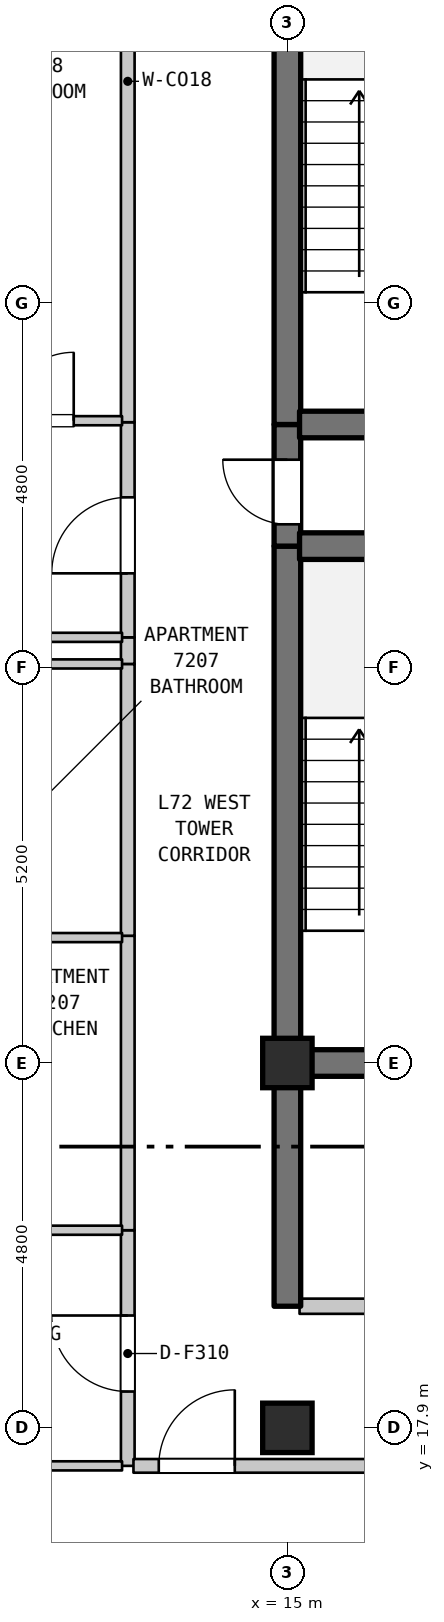
"""IFC4 building model, lengths in metres.
Left out: names, types, materials, properties, quantities, classifications, styles, units other than length and angle.
Written with IfcOpenShell. Run it as: python <this file> out.ifc"""

import sys

from ifc_helpers import new_model, si_unit, direction, frame, frame_2d, origin, origin_2d, place, context, subcontext, project, spatial, rectangle, extrude, element, fill, save


model = new_model("IFC4")
c1 = context("Model", 3, precision=1e-05, world=origin(), true_north=direction((0.0, 1.0)))
c2 = subcontext(c1, "Body", "Model", "MODEL_VIEW")
j1 = project(units=[si_unit("LENGTHUNIT", "METRE"), si_unit("PLANEANGLEUNIT", "RADIAN")], contexts=[c1])
p1 = place(None, origin())
s1 = spatial("IfcSite", under=j1, at=p1, CompositionType="ELEMENT")
p2 = place(p1, origin())
s2 = spatial("IfcBuilding", under=s1, at=p2, CompositionType="ELEMENT")
p3 = place(p2, frame((0.0, 0.0, 288.0)))
s3 = spatial("IfcBuildingStorey", under=s2, at=p3, CompositionType="ELEMENT", Elevation=288.0)
for number, where, z_axis, x_axis in (
    (1, (15.0, 17.9, 0.0), (0.0, 0.0, 1.0), (1.0, 0.0, 0.0)),
    (2, (15.0, 22.7, 0.0), (0.0, 0.0, 1.0), (1.0, 0.0, 0.0)),
):
    element("IfcColumn", number, at=place(p3, frame(where, z_axis=z_axis, x_axis=x_axis)), inside=s3, PredefinedType="COLUMN", context=c2, shape_type="SweptSolid", body=[
        extrude(rectangle(XDim=0.65, YDim=0.65, at=origin_2d()), origin(), (0.0, 0.0, 1.0), 3.7),
    ])
p4 = place(p3, frame((12.9, 17.4, 0.0), z_axis=(0.0, 0.0, 1.0), x_axis=(0.0, 1.0, 0.0)))
e3 = element("IfcWall", 3, at=p4, inside=s3, PredefinedType="STANDARD", context=c2, shape_type="SweptSolid", body=[
    extrude(rectangle(XDim=3.1, YDim=0.18, at=frame_2d((1.55, 0.0))), origin(), (0.0, 0.0, 1.0), 3.39),
])
p5 = place(p4, frame((0.978, 0.0, 0.0)))
e4 = element("IfcOpeningElement", 4, at=p5, cuts=e3, PredefinedType="OPENING", context=c2, shape_type="SweptSolid", body=[
    extrude(rectangle(XDim=1.0, YDim=2.15, at=frame_2d((0.5, 1.075))), frame((0.0, 0.1, 0.0), z_axis=(0.0, -1.0, 0.0), x_axis=(1.0, 0.0, 0.0)), (0.0, 0.0, 1.0), 0.2),
])
p6 = place(p3, frame((12.9, 20.5, 0.0), z_axis=(0.0, 0.0, 1.0), x_axis=(0.0, 1.0, 0.0)))
e5 = element("IfcWall", 5, at=p6, inside=s3, PredefinedType="STANDARD", context=c2, shape_type="SweptSolid", body=[
    extrude(rectangle(XDim=3.874, YDim=0.18, at=frame_2d((1.937, 0.0))), origin(), (0.0, 0.0, 1.0), 3.39),
])
p7 = place(p3, frame((12.9, 24.374, 0.0), z_axis=(0.0, 0.0, 1.0), x_axis=(0.0, 1.0, 0.0)))
e6 = element("IfcWall", 6, at=p7, inside=s3, PredefinedType="STANDARD", context=c2, shape_type="SweptSolid", body=[
    extrude(rectangle(XDim=3.576, YDim=0.18, at=frame_2d((1.788, 0.0))), origin(), (0.0, 0.0, 1.0), 3.39),
])
p8 = place(p3, frame((12.9, 27.95, 0.0), z_axis=(0.0, 0.0, 1.0), x_axis=(0.0, 1.0, 0.0)))
e7 = element("IfcWall", 7, at=p8, inside=s3, PredefinedType="STANDARD", context=c2, shape_type="SweptSolid", body=[
    extrude(rectangle(XDim=0.35, YDim=0.18, at=frame_2d((0.175, 0.0))), origin(), (0.0, 0.0, 1.0), 3.39),
])
p9 = place(p3, frame((12.9, 28.3, 0.0), z_axis=(0.0, 0.0, 1.0), x_axis=(0.0, 1.0, 0.0)))
e8 = element("IfcWall", 8, at=p9, inside=s3, PredefinedType="STANDARD", context=c2, shape_type="SweptSolid", body=[
    extrude(rectangle(XDim=2.83, YDim=0.18, at=frame_2d((1.415, 0.0))), origin(), (0.0, 0.0, 1.0), 3.39),
])
p10 = place(p9, frame((0.842, 0.0, 0.0)))
e9 = element("IfcOpeningElement", 9, at=p10, cuts=e8, PredefinedType="OPENING", context=c2, shape_type="SweptSolid", body=[
    extrude(rectangle(XDim=1.0, YDim=2.15, at=frame_2d((0.5, 1.075))), frame((0.0, 0.1, 0.0), z_axis=(0.0, -1.0, 0.0), x_axis=(1.0, 0.0, 0.0)), (0.0, 0.0, 1.0), 0.2),
])
p11 = place(p3, frame((12.9, 31.13, 0.0), z_axis=(0.0, 0.0, 1.0), x_axis=(0.0, 1.0, 0.0)))
e10 = element("IfcWall", 10, at=p11, inside=s3, PredefinedType="STANDARD", context=c2, shape_type="SweptSolid", body=[
    extrude(rectangle(XDim=8.97, YDim=0.18, at=frame_2d((4.485, 0.0))), origin(), (0.0, 0.0, 1.0), 3.39),
])
p12 = place(p3, frame((15.0, 19.5, 0.0), z_axis=(0.0, 0.0, 1.0), x_axis=(0.0, 1.0, 0.0)))
e11 = element("IfcWall", 11, at=p12, inside=s3, PredefinedType="SHEAR", context=c2, shape_type="SweptSolid", body=[
    extrude(rectangle(XDim=3.2, YDim=0.35, at=frame_2d((1.6, 0.0))), origin(), (0.0, 0.0, 1.0), 3.39),
])
p13 = place(p3, frame((15.0, 22.7, 0.0), z_axis=(0.0, 0.0, 1.0), x_axis=(0.0, 1.0, 0.0)))
e12 = element("IfcWall", 12, at=p13, inside=s3, PredefinedType="SHEAR", context=c2, shape_type="SweptSolid", body=[
    extrude(rectangle(XDim=6.8, YDim=0.35, at=frame_2d((3.4, 0.0))), origin(), (0.0, 0.0, 1.0), 3.39),
])
p14 = place(p3, frame((15.0, 29.5, 0.0), z_axis=(0.0, 0.0, 1.0), x_axis=(0.0, 1.0, 0.0)))
e13 = element("IfcWall", 13, at=p14, inside=s3, PredefinedType="SHEAR", context=c2, shape_type="SweptSolid", body=[
    extrude(rectangle(XDim=1.6, YDim=0.35, at=frame_2d((0.8, 0.0))), origin(), (0.0, 0.0, 1.0), 3.39),
])
p15 = place(p14, frame((0.287, 0.0, 0.0)))
e14 = element("IfcOpeningElement", 14, at=p15, cuts=e13, PredefinedType="OPENING", context=c2, shape_type="SweptSolid", body=[
    extrude(rectangle(XDim=0.85, YDim=2.1, at=frame_2d((0.425, 1.05))), frame((0.0, 0.185, 0.0), z_axis=(0.0, -1.0, 0.0), x_axis=(1.0, 0.0, 0.0)), (0.0, 0.0, 1.0), 0.37),
])
p16 = place(p3, frame((15.0, 31.1, 0.0), z_axis=(0.0, 0.0, 1.0), x_axis=(0.0, 1.0, 0.0)))
e15 = element("IfcWall", 15, at=p16, inside=s3, PredefinedType="SHEAR", context=c2, shape_type="SweptSolid", body=[
    extrude(rectangle(XDim=6.8, YDim=0.35, at=frame_2d((3.4, 0.0))), origin(), (0.0, 0.0, 1.0), 3.39),
])
p17 = place(p3, frame((8.973, 17.4, 0.0), z_axis=(0.0, 0.0, 1.0), x_axis=(1.0, 0.0, 0.0)))
e16 = element("IfcWall", 16, at=p17, inside=s3, PredefinedType="PARTITIONING", context=c2, shape_type="SweptSolid", body=[
    extrude(rectangle(XDim=3.852, YDim=0.12, at=frame_2d((1.926, 0.0))), origin(), (0.0, 0.0, 1.0), 3.39),
])
p18 = place(p3, frame((12.975, 17.4, 0.0), z_axis=(0.0, 0.0, 1.0), x_axis=(1.0, 0.0, 0.0)))
e17 = element("IfcWall", 17, at=p18, inside=s3, PredefinedType="STANDARD", context=c2, shape_type="SweptSolid", body=[
    extrude(rectangle(XDim=3.48, YDim=0.18, at=frame_2d((1.74, 0.0))), origin(), (0.0, 0.0, 1.0), 3.39),
])
p19 = place(p18, frame((0.333, 0.0, 0.0)))
e18 = element("IfcOpeningElement", 18, at=p19, cuts=e17, PredefinedType="OPENING", context=c2, shape_type="SweptSolid", body=[
    extrude(rectangle(XDim=1.0, YDim=2.15, at=frame_2d((0.5, 1.075))), frame((0.0, 0.1, 0.0), z_axis=(0.0, -1.0, 0.0), x_axis=(1.0, 0.0, 0.0)), (0.0, 0.0, 1.0), 0.2),
])
p20 = place(p3, frame((15.16, 19.5, 0.0), z_axis=(0.0, 0.0, 1.0), x_axis=(1.0, 0.0, 0.0)))
e19 = element("IfcWall", 19, at=p20, inside=s3, PredefinedType="STANDARD", context=c2, shape_type="SweptSolid", body=[
    extrude(rectangle(XDim=3.68, YDim=0.2, at=frame_2d((1.84, 0.0))), origin(), (0.0, 0.0, 1.0), 3.39),
])
p21 = place(p20, frame((1.39, 0.0, 0.0)))
e20 = element("IfcOpeningElement", 20, at=p21, cuts=e19, PredefinedType="OPENING", context=c2, shape_type="SweptSolid", body=[
    extrude(rectangle(XDim=0.9, YDim=2.15, at=frame_2d((0.45, 1.075))), frame((0.0, 0.11, 0.0), z_axis=(0.0, -1.0, 0.0), x_axis=(1.0, 0.0, 0.0)), (0.0, 0.0, 1.0), 0.22),
])
p22 = place(p3, frame((10.695, 20.5, 0.0), z_axis=(0.0, 0.0, 1.0), x_axis=(1.0, 0.0, 0.0)))
e21 = element("IfcWall", 21, at=p22, inside=s3, PredefinedType="PARTITIONING", context=c2, shape_type="SweptSolid", body=[
    extrude(rectangle(XDim=2.13, YDim=0.12, at=frame_2d((1.065, 0.0))), origin(), (0.0, 0.0, 1.0), 3.39),
])
p23 = place(p3, frame((15.16, 22.7, 0.0), z_axis=(0.0, 0.0, 1.0), x_axis=(1.0, 0.0, 0.0)))
e22 = element("IfcWall", 22, at=p23, inside=s3, PredefinedType="SHEAR", context=c2, shape_type="SweptSolid", body=[
    extrude(rectangle(XDim=3.68, YDim=0.35, at=frame_2d((1.84, 0.0))), origin(), (0.0, 0.0, 1.0), 3.39),
])
for number, where, z_axis, x_axis in (
    (23, (10.695, 24.35, 0.0), (0.0, 0.0, 1.0), (1.0, 0.0, 0.0)),
    (24, (10.695, 27.95, 0.0), (0.0, 0.0, 1.0), (1.0, 0.0, 0.0)),
):
    element("IfcWall", number, at=place(p3, frame(where, z_axis=z_axis, x_axis=x_axis)), inside=s3, PredefinedType="PARTITIONING", context=c2, shape_type="SweptSolid", body=[
        extrude(rectangle(XDim=2.13, YDim=0.12, at=frame_2d((1.065, 0.0))), origin(), (0.0, 0.0, 1.0), 3.39),
    ])
p24 = place(p3, frame((9.175, 28.3, 0.0), z_axis=(0.0, 0.0, 1.0), x_axis=(1.0, 0.0, 0.0)))
e25 = element("IfcWall", 25, at=p24, inside=s3, PredefinedType="PARTITIONING", context=c2, shape_type="SweptSolid", body=[
    extrude(rectangle(XDim=3.65, YDim=0.12, at=frame_2d((1.825, 0.0))), origin(), (0.0, 0.0, 1.0), 3.39),
])
for number, where, z_axis, x_axis in (
    (26, (15.16, 29.5, 0.0), (0.0, 0.0, 1.0), (1.0, 0.0, 0.0)),
    (27, (15.16, 31.1, 0.0), (0.0, 0.0, 1.0), (1.0, 0.0, 0.0)),
):
    element("IfcWall", number, at=place(p3, frame(where, z_axis=z_axis, x_axis=x_axis)), inside=s3, PredefinedType="SHEAR", context=c2, shape_type="SweptSolid", body=[
        extrude(rectangle(XDim=3.68, YDim=0.35, at=frame_2d((1.84, 0.0))), origin(), (0.0, 0.0, 1.0), 3.39),
    ])
p25 = place(p3, frame((10.623, 31.15, 0.0), z_axis=(0.0, 0.0, 1.0), x_axis=(1.0, 0.0, 0.0)))
e28 = element("IfcWall", 28, at=p25, inside=s3, PredefinedType="PARTITIONING", context=c2, shape_type="SweptSolid", body=[
    extrude(rectangle(XDim=2.202, YDim=0.12, at=frame_2d((1.101, 0.0))), origin(), (0.0, 0.0, 1.0), 3.39),
])
p26 = place(p25, frame((0.666, 0.0, 0.0)))
e29 = element("IfcOpeningElement", 29, at=p26, cuts=e28, PredefinedType="OPENING", context=c2, shape_type="SweptSolid", body=[
    extrude(rectangle(XDim=0.9, YDim=2.1, at=frame_2d((0.45, 1.05))), frame((0.0, 0.07, 0.0), z_axis=(0.0, -1.0, 0.0), x_axis=(1.0, 0.0, 0.0)), (0.0, 0.0, 1.0), 0.14),
])
p27 = place(p5, origin())
e30 = element("IfcDoor", 30, at=p27, inside=s3, OperationType="SINGLE_SWING_RIGHT", PredefinedType="DOOR", context=c2, shape_type="SweptSolid", body=[
    extrude(rectangle(XDim=1.0, YDim=2.15, at=frame_2d((0.5, 1.075))), frame((0.0, 0.025, 0.0), z_axis=(0.0, -1.0, 0.0), x_axis=(1.0, 0.0, 0.0)), (0.0, 0.0, 1.0), 0.05),
])
fill(e4, e30)
p28 = place(p10, origin())
e31 = element("IfcDoor", 31, at=p28, inside=s3, OperationType="SINGLE_SWING_LEFT", PredefinedType="DOOR", context=c2, shape_type="SweptSolid", body=[
    extrude(rectangle(XDim=1.0, YDim=2.15, at=frame_2d((0.5, 1.075))), frame((0.0, 0.025, 0.0), z_axis=(0.0, -1.0, 0.0), x_axis=(1.0, 0.0, 0.0)), (0.0, 0.0, 1.0), 0.05),
])
fill(e9, e31)
p29 = place(p15, origin())
e32 = element("IfcDoor", 32, at=p29, inside=s3, OperationType="SINGLE_SWING_RIGHT", PredefinedType="DOOR", context=c2, shape_type="SweptSolid", body=[
    extrude(rectangle(XDim=0.85, YDim=2.1, at=frame_2d((0.425, 1.05))), frame((0.0, 0.025, 0.0), z_axis=(0.0, -1.0, 0.0), x_axis=(1.0, 0.0, 0.0)), (0.0, 0.0, 1.0), 0.05),
])
fill(e14, e32)
p30 = place(p19, origin())
e33 = element("IfcDoor", 33, at=p30, inside=s3, OperationType="SINGLE_SWING_RIGHT", PredefinedType="DOOR", context=c2, shape_type="SweptSolid", body=[
    extrude(rectangle(XDim=1.0, YDim=2.15, at=frame_2d((0.5, 1.075))), frame((0.0, 0.025, 0.0), z_axis=(0.0, -1.0, 0.0), x_axis=(1.0, 0.0, 0.0)), (0.0, 0.0, 1.0), 0.05),
])
fill(e18, e33)
p31 = place(p26, origin())
e34 = element("IfcDoor", 34, at=p31, inside=s3, OperationType="SINGLE_SWING_RIGHT", PredefinedType="DOOR", context=c2, shape_type="SweptSolid", body=[
    extrude(rectangle(XDim=0.9, YDim=2.1, at=frame_2d((0.45, 1.05))), frame((0.0, 0.025, 0.0), z_axis=(0.0, -1.0, 0.0), x_axis=(1.0, 0.0, 0.0)), (0.0, 0.0, 1.0), 0.05),
])
fill(e29, e34)
save(model, sys.argv[1])
